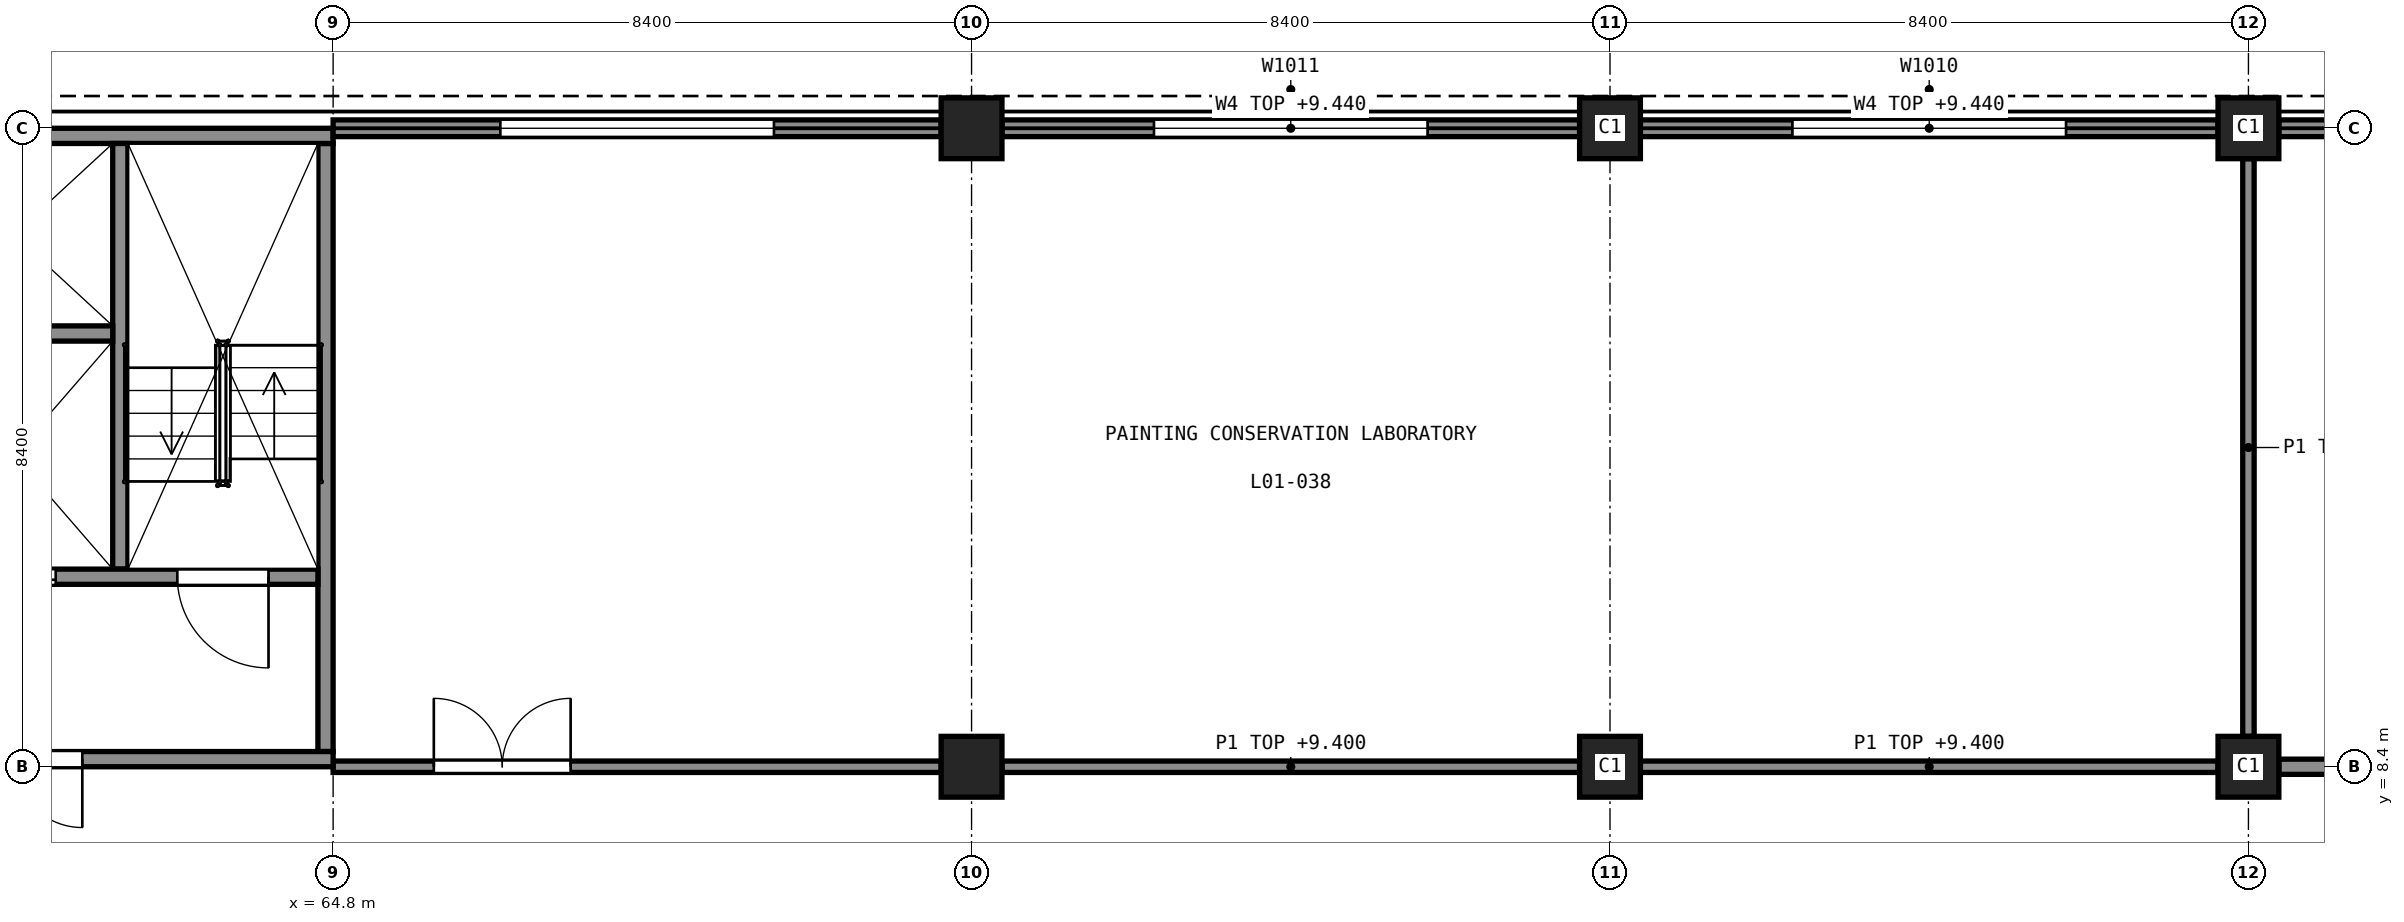
"""IFC4 building model, lengths in metres.
Left out: names, types, materials, properties, quantities, classifications, styles, units other than length and angle.
Written with IfcOpenShell. Run it as: python <this file> out.ifc"""

import sys

from ifc_helpers import new_model, si_unit, direction, frame, frame_2d, origin, origin_2d, place, context, subcontext, project, spatial, rectangle, extrude, element, fill, save


model = new_model("IFC4")
c1 = context("Model", 3, precision=1e-05, world=origin(), true_north=direction((0.0, 1.0)))
c2 = subcontext(c1, "Body", "Model", "MODEL_VIEW")
j1 = project(units=[si_unit("LENGTHUNIT", "METRE"), si_unit("PLANEANGLEUNIT", "RADIAN")], contexts=[c1])
p1 = place(None, origin())
s1 = spatial("IfcSite", under=j1, at=p1, CompositionType="ELEMENT")
p2 = place(p1, origin())
s2 = spatial("IfcBuilding", under=s1, at=p2, CompositionType="ELEMENT")
p3 = place(p2, frame((0.0, 0.0, 5.5)))
s3 = spatial("IfcBuildingStorey", under=s2, at=p3, CompositionType="ELEMENT", Elevation=5.5)
p4 = place(p3, frame((56.4, 8.5, 0.0), z_axis=(0.0, 0.0, 1.0), x_axis=(1.0, 0.0, 0.0)))
e1 = element("IfcWall", 1, at=p4, inside=s3, PredefinedType="SHEAR", context=c2, shape_type="SweptSolid", body=[
    extrude(rectangle(XDim=8.4, YDim=0.2, at=frame_2d((4.2, 0.0))), origin(), (0.0, 0.0, 1.0), 5.0),
])
p5 = place(p4, frame((3.3, 0.0, 0.0)))
e2 = element("IfcOpeningElement", 2, at=p5, cuts=e1, PredefinedType="OPENING", context=c2, shape_type="SweptSolid", body=[
    extrude(rectangle(XDim=1.8, YDim=2.1, at=frame_2d((0.9, 1.05))), frame((0.0, 0.11, 0.0), z_axis=(0.0, -1.0, 0.0), x_axis=(1.0, 0.0, 0.0)), (0.0, 0.0, 1.0), 0.22),
])
p6 = place(p3, frame((56.4, 16.7, 0.0), z_axis=(0.0, 0.0, 1.0), x_axis=(1.0, 0.0, 0.0)))
e3 = element("IfcWall", 3, at=p6, inside=s3, PredefinedType="SHEAR", context=c2, shape_type="SweptSolid", body=[
    extrude(rectangle(XDim=8.4, YDim=0.2, at=frame_2d((4.2, 0.0))), origin(), (0.0, 0.0, 1.0), 5.0),
])
p7 = place(p3, frame((64.7, 8.6, 0.0), z_axis=(0.0, 0.0, 1.0), x_axis=(0.0, 1.0, 0.0)))
e4 = element("IfcWall", 4, at=p7, inside=s3, PredefinedType="SHEAR", context=c2, shape_type="SweptSolid", body=[
    extrude(rectangle(XDim=8.0, YDim=0.2, at=frame_2d((4.0, 0.0))), origin(), (0.0, 0.0, 1.0), 5.0),
])
p8 = place(p3, frame((56.6, 10.9, 0.0), z_axis=(0.0, 0.0, 1.0), x_axis=(1.0, 0.0, 0.0)))
e5 = element("IfcWall", 5, at=p8, inside=s3, PredefinedType="SHEAR", context=c2, shape_type="SweptSolid", body=[
    extrude(rectangle(XDim=8.0, YDim=0.2, at=frame_2d((4.0, 0.0))), origin(), (0.0, 0.0, 1.0), 5.0),
])
p9 = place(p8, frame((0.65, 0.0, 0.0)))
e6 = element("IfcOpeningElement", 6, at=p9, cuts=e5, PredefinedType="OPENING", context=c2, shape_type="SweptSolid", body=[
    extrude(rectangle(XDim=1.2, YDim=2.1, at=frame_2d((0.6, 1.05))), frame((0.0, 0.11, 0.0), z_axis=(0.0, -1.0, 0.0), x_axis=(1.0, 0.0, 0.0)), (0.0, 0.0, 1.0), 0.22),
])
p10 = place(p8, frame((6.15, 0.0, 0.0)))
e7 = element("IfcOpeningElement", 7, at=p10, cuts=e5, PredefinedType="OPENING", context=c2, shape_type="SweptSolid", body=[
    extrude(rectangle(XDim=1.2, YDim=2.1, at=frame_2d((0.6, 1.05))), frame((0.0, 0.11, 0.0), z_axis=(0.0, -1.0, 0.0), x_axis=(1.0, 0.0, 0.0)), (0.0, 0.0, 1.0), 0.22),
])
p11 = place(p8, frame((3.45, 0.0, 0.0)))
e8 = element("IfcOpeningElement", 8, at=p11, cuts=e5, PredefinedType="OPENING", context=c2, shape_type="SweptSolid", body=[
    extrude(rectangle(XDim=1.1, YDim=2.1, at=frame_2d((0.55, 1.05))), frame((0.0, 0.11, 0.0), z_axis=(0.0, -1.0, 0.0), x_axis=(1.0, 0.0, 0.0)), (0.0, 0.0, 1.0), 0.22),
])
p12 = place(p3, frame((62.0, 11.0, 0.0), z_axis=(0.0, 0.0, 1.0), x_axis=(0.0, 1.0, 0.0)))
e9 = element("IfcWall", 9, at=p12, inside=s3, PredefinedType="SHEAR", context=c2, shape_type="SweptSolid", body=[
    extrude(rectangle(XDim=5.6, YDim=0.2, at=frame_2d((2.8, 0.0))), origin(), (0.0, 0.0, 1.0), 5.0),
])
p13 = place(p3, frame((59.3, 14.1, 0.0), z_axis=(0.0, 0.0, 1.0), x_axis=(1.0, 0.0, 0.0)))
e10 = element("IfcWall", 10, at=p13, inside=s3, PredefinedType="SHEAR", context=c2, shape_type="SweptSolid", body=[
    extrude(rectangle(XDim=2.6, YDim=0.2, at=frame_2d((1.3, 0.0))), origin(), (0.0, 0.0, 1.0), 5.0),
])
for number, where, z_axis, x_axis in (
    (11, (73.2, 8.4, 0.0), (0.0, 0.0, 1.0), (1.0, 0.0, 0.0)),
    (12, (73.2, 16.8, 0.0), (0.0, 0.0, 1.0), (1.0, 0.0, 0.0)),
    (13, (81.6, 8.4, 0.0), (0.0, 0.0, 1.0), (1.0, 0.0, 0.0)),
    (14, (81.6, 16.8, 0.0), (0.0, 0.0, 1.0), (1.0, 0.0, 0.0)),
    (15, (90.0, 8.4, 0.0), (0.0, 0.0, 1.0), (1.0, 0.0, 0.0)),
    (16, (90.0, 16.8, 0.0), (0.0, 0.0, 1.0), (1.0, 0.0, 0.0)),
):
    element("IfcColumn", number, at=place(p3, frame(where, z_axis=z_axis, x_axis=x_axis)), inside=s3, PredefinedType="COLUMN", context=c2, shape_type="SweptSolid", body=[
        extrude(rectangle(XDim=0.8, YDim=0.8, at=origin_2d()), origin(), (0.0, 0.0, 1.0), 5.0),
    ])
p14 = place(p3, frame((90.4, 16.8, 0.0), z_axis=(0.0, 0.0, 1.0), x_axis=(1.0, 0.0, 0.0)))
e17 = element("IfcWall", 17, at=p14, inside=s3, PredefinedType="SOLIDWALL", context=c2, shape_type="SweptSolid", body=[
    extrude(rectangle(XDim=7.6, YDim=0.22, at=frame_2d((3.8, 0.0))), origin(), (0.0, 0.0, 1.0), 3.94),
])
p15 = place(p14, frame((2.0, 0.0, 0.9)))
e18 = element("IfcOpeningElement", 18, at=p15, cuts=e17, PredefinedType="OPENING", context=c2, shape_type="SweptSolid", body=[
    extrude(rectangle(XDim=3.6, YDim=1.5, at=frame_2d((1.8, 0.75))), frame((0.0, 0.12, 0.0), z_axis=(0.0, -1.0, 0.0), x_axis=(1.0, 0.0, 0.0)), (0.0, 0.0, 1.0), 0.24),
])
p16 = place(p3, frame((82.0, 16.8, 0.0), z_axis=(0.0, 0.0, 1.0), x_axis=(1.0, 0.0, 0.0)))
e19 = element("IfcWall", 19, at=p16, inside=s3, PredefinedType="SOLIDWALL", context=c2, shape_type="SweptSolid", body=[
    extrude(rectangle(XDim=7.6, YDim=0.22, at=frame_2d((3.8, 0.0))), origin(), (0.0, 0.0, 1.0), 3.94),
])
p17 = place(p16, frame((2.0, 0.0, 0.9)))
e20 = element("IfcOpeningElement", 20, at=p17, cuts=e19, PredefinedType="OPENING", context=c2, shape_type="SweptSolid", body=[
    extrude(rectangle(XDim=3.6, YDim=1.5, at=frame_2d((1.8, 0.75))), frame((0.0, 0.12, 0.0), z_axis=(0.0, -1.0, 0.0), x_axis=(1.0, 0.0, 0.0)), (0.0, 0.0, 1.0), 0.24),
])
p18 = place(p3, frame((73.6, 16.8, 0.0), z_axis=(0.0, 0.0, 1.0), x_axis=(1.0, 0.0, 0.0)))
e21 = element("IfcWall", 21, at=p18, inside=s3, PredefinedType="SOLIDWALL", context=c2, shape_type="SweptSolid", body=[
    extrude(rectangle(XDim=7.6, YDim=0.22, at=frame_2d((3.8, 0.0))), origin(), (0.0, 0.0, 1.0), 3.94),
])
p19 = place(p18, frame((2.0, 0.0, 0.9)))
e22 = element("IfcOpeningElement", 22, at=p19, cuts=e21, PredefinedType="OPENING", context=c2, shape_type="SweptSolid", body=[
    extrude(rectangle(XDim=3.6, YDim=1.5, at=frame_2d((1.8, 0.75))), frame((0.0, 0.12, 0.0), z_axis=(0.0, -1.0, 0.0), x_axis=(1.0, 0.0, 0.0)), (0.0, 0.0, 1.0), 0.24),
])
p20 = place(p3, frame((64.8, 16.8, 0.0), z_axis=(0.0, 0.0, 1.0), x_axis=(1.0, 0.0, 0.0)))
e23 = element("IfcWall", 23, at=p20, inside=s3, PredefinedType="SOLIDWALL", context=c2, shape_type="SweptSolid", body=[
    extrude(rectangle(XDim=8.0, YDim=0.22, at=frame_2d((4.0, 0.0))), origin(), (0.0, 0.0, 1.0), 3.94),
])
p21 = place(p20, frame((2.2, 0.0, 0.9)))
e24 = element("IfcOpeningElement", 24, at=p21, cuts=e23, PredefinedType="OPENING", context=c2, shape_type="SweptSolid", body=[
    extrude(rectangle(XDim=3.6, YDim=1.5, at=frame_2d((1.8, 0.75))), frame((0.0, 0.12, 0.0), z_axis=(0.0, -1.0, 0.0), x_axis=(1.0, 0.0, 0.0)), (0.0, 0.0, 1.0), 0.24),
])
p22 = place(p3, frame((90.0, 8.8, 0.0), z_axis=(0.0, 0.0, 1.0), x_axis=(0.0, 1.0, 0.0)))
e25 = element("IfcWall", 25, at=p22, inside=s3, PredefinedType="PARTITIONING", context=c2, shape_type="SweptSolid", body=[
    extrude(rectangle(XDim=7.6, YDim=0.15, at=frame_2d((3.8, 0.0))), origin(), (0.0, 0.0, 1.0), 3.9),
])
p23 = place(p3, frame((64.8, 8.4, 0.0), z_axis=(0.0, 0.0, 1.0), x_axis=(1.0, 0.0, 0.0)))
e26 = element("IfcWall", 26, at=p23, inside=s3, PredefinedType="PARTITIONING", context=c2, shape_type="SweptSolid", body=[
    extrude(rectangle(XDim=8.0, YDim=0.15, at=frame_2d((4.0, 0.0))), origin(), (0.0, 0.0, 1.0), 3.9),
])
p24 = place(p23, frame((1.325, 0.0, 0.0)))
e27 = element("IfcOpeningElement", 27, at=p24, cuts=e26, PredefinedType="OPENING", context=c2, shape_type="SweptSolid", body=[
    extrude(rectangle(XDim=1.8, YDim=2.1, at=frame_2d((0.9, 1.05))), frame((0.0, 0.085, 0.0), z_axis=(0.0, -1.0, 0.0), x_axis=(1.0, 0.0, 0.0)), (0.0, 0.0, 1.0), 0.17),
])
p25 = place(p3, frame((73.6, 8.4, 0.0), z_axis=(0.0, 0.0, 1.0), x_axis=(1.0, 0.0, 0.0)))
e28 = element("IfcWall", 28, at=p25, inside=s3, PredefinedType="PARTITIONING", context=c2, shape_type="SweptSolid", body=[
    extrude(rectangle(XDim=7.6, YDim=0.15, at=frame_2d((3.8, 0.0))), origin(), (0.0, 0.0, 1.0), 3.9),
])
p26 = place(p3, frame((82.0, 8.4, 0.0), z_axis=(0.0, 0.0, 1.0), x_axis=(1.0, 0.0, 0.0)))
e29 = element("IfcWall", 29, at=p26, inside=s3, PredefinedType="PARTITIONING", context=c2, shape_type="SweptSolid", body=[
    extrude(rectangle(XDim=7.6, YDim=0.15, at=frame_2d((3.8, 0.0))), origin(), (0.0, 0.0, 1.0), 3.9),
])
p27 = place(p3, frame((90.4, 8.4, 0.0), z_axis=(0.0, 0.0, 1.0), x_axis=(1.0, 0.0, 0.0)))
e30 = element("IfcWall", 30, at=p27, inside=s3, PredefinedType="PARTITIONING", context=c2, shape_type="SweptSolid", body=[
    extrude(rectangle(XDim=7.6, YDim=0.2, at=frame_2d((3.8, 0.0))), origin(), (0.0, 0.0, 1.0), 3.9),
])
p28 = place(p17, origin())
e31 = element("IfcWindow", 31, at=p28, inside=s3, PartitioningType="DOUBLE_PANEL_VERTICAL", PredefinedType="WINDOW", context=c2, shape_type="SweptSolid", body=[
    extrude(rectangle(XDim=3.6, YDim=1.5, at=frame_2d((1.8, 0.75))), frame((0.0, -0.03, 0.0), z_axis=(0.0, -1.0, 0.0), x_axis=(1.0, 0.0, 0.0)), (0.0, 0.0, 1.0), 0.06),
])
fill(e20, e31)
p29 = place(p19, origin())
e32 = element("IfcWindow", 32, at=p29, inside=s3, PartitioningType="DOUBLE_PANEL_VERTICAL", PredefinedType="WINDOW", context=c2, shape_type="SweptSolid", body=[
    extrude(rectangle(XDim=3.6, YDim=1.5, at=frame_2d((1.8, 0.75))), frame((0.0, -0.03, 0.0), z_axis=(0.0, -1.0, 0.0), x_axis=(1.0, 0.0, 0.0)), (0.0, 0.0, 1.0), 0.06),
])
fill(e22, e32)
p30 = place(p21, origin())
e33 = element("IfcWindow", 33, at=p30, inside=s3, PartitioningType="DOUBLE_PANEL_VERTICAL", PredefinedType="WINDOW", context=c2, shape_type="SweptSolid", body=[
    extrude(rectangle(XDim=3.6, YDim=1.5, at=frame_2d((1.8, 0.75))), frame((0.0, -0.03, 0.0), z_axis=(0.0, -1.0, 0.0), x_axis=(1.0, 0.0, 0.0)), (0.0, 0.0, 1.0), 0.06),
])
fill(e24, e33)
p31 = place(p24, origin())
e34 = element("IfcDoor", 34, at=p31, inside=s3, OperationType="DOUBLE_DOOR_SINGLE_SWING", PredefinedType="DOOR", context=c2, shape_type="SweptSolid", body=[
    extrude(rectangle(XDim=1.8, YDim=2.1, at=frame_2d((0.9, 1.05))), frame((0.0, 0.025, 0.0), z_axis=(0.0, -1.0, 0.0), x_axis=(1.0, 0.0, 0.0)), (0.0, 0.0, 1.0), 0.05),
])
fill(e27, e34)
p32 = place(p5, origin())
e35 = element("IfcDoor", 35, at=p32, inside=s3, OperationType="DOUBLE_DOOR_SINGLE_SWING", PredefinedType="DOOR", context=c2, shape_type="SweptSolid", body=[
    extrude(rectangle(XDim=1.8, YDim=2.1, at=frame_2d((0.9, 1.05))), frame((0.0, 0.025, 0.0), z_axis=(0.0, -1.0, 0.0), x_axis=(1.0, 0.0, 0.0)), (0.0, 0.0, 1.0), 0.05),
])
fill(e2, e35)
p33 = place(p10, origin())
e36 = element("IfcDoor", 36, at=p33, inside=s3, OperationType="SINGLE_SWING_RIGHT", PredefinedType="DOOR", context=c2, shape_type="SweptSolid", body=[
    extrude(rectangle(XDim=1.2, YDim=2.1, at=frame_2d((0.6, 1.05))), frame((0.0, 0.025, 0.0), z_axis=(0.0, -1.0, 0.0), x_axis=(1.0, 0.0, 0.0)), (0.0, 0.0, 1.0), 0.05),
])
fill(e7, e36)
p34 = place(p11, origin())
e37 = element("IfcDoor", 37, at=p34, inside=s3, OperationType="DOUBLE_DOOR_SLIDING", PredefinedType="DOOR", context=c2, shape_type="SweptSolid", body=[
    extrude(rectangle(XDim=1.1, YDim=2.1, at=frame_2d((0.55, 1.05))), frame((0.0, 0.025, 0.0), z_axis=(0.0, -1.0, 0.0), x_axis=(1.0, 0.0, 0.0)), (0.0, 0.0, 1.0), 0.05),
])
fill(e8, e37)
save(model, sys.argv[1])
